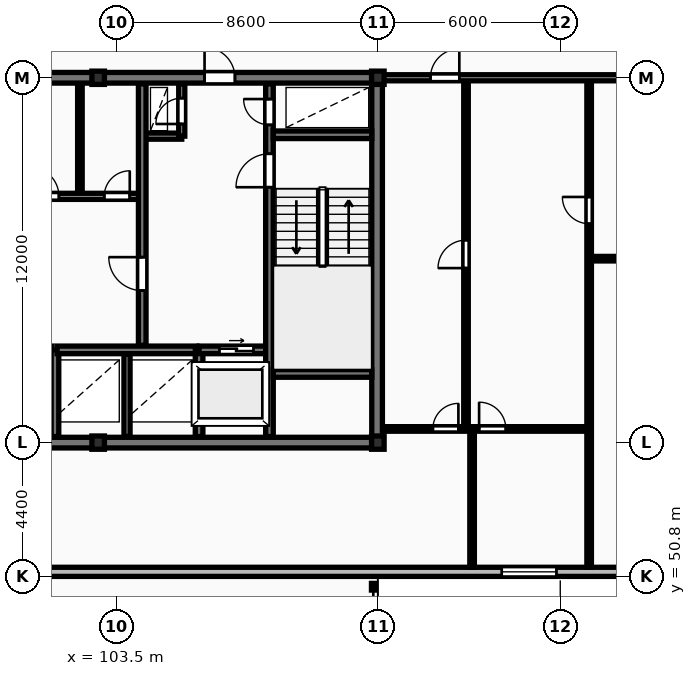
"""IFC4 building model, lengths in metres.
Left out: names, types, materials, properties, quantities, classifications, styles, units other than length and angle.
Written with IfcOpenShell. Run it as: python <this file> out.ifc"""

import sys

from ifc_helpers import new_model, si_unit, direction, frame, frame_2d, origin, origin_2d, place, context, subcontext, project, spatial, rectangle, i_section, extrude, element, fill, save


model = new_model("IFC4")
c1 = context("Model", 3, precision=1e-05, world=origin(), true_north=direction((0.0, 1.0)))
c2 = subcontext(c1, "Body", "Model", "MODEL_VIEW")
j1 = project(units=[si_unit("LENGTHUNIT", "METRE"), si_unit("PLANEANGLEUNIT", "RADIAN")], contexts=[c1])
p1 = place(None, origin())
s1 = spatial("IfcSite", under=j1, at=p1, CompositionType="ELEMENT")
p2 = place(p1, origin())
s2 = spatial("IfcBuilding", under=s1, at=p2, CompositionType="ELEMENT")
p3 = place(p2, frame((0.0, 0.0, 139.3)))
s3 = spatial("IfcBuildingStorey", under=s2, at=p3, CompositionType="ELEMENT", Elevation=139.3)
for number, where, z_axis, x_axis in (
    (1, (102.9, 55.2, 0.0), (0.0, 0.0, 1.0), (1.0, 0.0, 0.0)),
    (2, (102.9, 67.2, 0.0), (0.0, 0.0, 1.0), (1.0, 0.0, 0.0)),
    (3, (112.1, 55.2, 0.0), (0.0, 0.0, 1.0), (1.0, 0.0, 0.0)),
    (4, (112.1, 67.2, 0.0), (0.0, 0.0, 1.0), (1.0, 0.0, 0.0)),
):
    element("IfcColumn", number, at=place(p3, frame(where, z_axis=z_axis, x_axis=x_axis)), inside=s3, PredefinedType="COLUMN", context=c2, shape_type="SweptSolid", body=[
        extrude(i_section(OverallWidth=0.412, OverallDepth=0.437, WebThickness=0.036, FlangeThickness=0.052, FilletRadius=0.015, at=origin_2d()), origin(), (0.0, 0.0, 1.0), 3.6),
    ])
p4 = place(p3, frame((57.6, 50.95, 0.0), z_axis=(0.0, 0.0, 1.0), x_axis=(1.0, 0.0, 0.0)))
e5 = element("IfcWall", 5, at=p4, inside=s3, PredefinedType="STANDARD", context=c2, shape_type="SweptSolid", body=[
    extrude(rectangle(XDim=73.0, YDim=0.3, at=frame_2d((36.5, 0.0))), origin(), (0.0, 0.0, 1.0), 3.31),
])
p5 = place(p4, frame((15.225, 0.0, 0.85)))
e6 = element("IfcOpeningElement", 6, at=p5, cuts=e5, PredefinedType="OPENING", context=c2, shape_type="SweptSolid", body=[
    extrude(rectangle(XDim=1.8, YDim=1.8, at=frame_2d((0.9, 0.9))), frame((0.0, 0.16, 0.0), z_axis=(0.0, -1.0, 0.0), x_axis=(1.0, 0.0, 0.0)), (0.0, 0.0, 1.0), 0.32),
])
p6 = place(p4, frame((58.575, 0.0, 0.85)))
e7 = element("IfcOpeningElement", 7, at=p6, cuts=e5, PredefinedType="OPENING", context=c2, shape_type="SweptSolid", body=[
    extrude(rectangle(XDim=1.8, YDim=1.8, at=frame_2d((0.9, 0.9))), frame((0.0, 0.16, 0.0), z_axis=(0.0, -1.0, 0.0), x_axis=(1.0, 0.0, 0.0)), (0.0, 0.0, 1.0), 0.32),
])
p7 = place(p4, frame((33.45, 0.0, 0.0)))
e8 = element("IfcOpeningElement", 8, at=p7, cuts=e5, PredefinedType="OPENING", context=c2, shape_type="SweptSolid", body=[
    extrude(rectangle(XDim=1.1, YDim=2.1, at=frame_2d((0.55, 1.05))), frame((0.0, 0.16, 0.0), z_axis=(0.0, -1.0, 0.0), x_axis=(1.0, 0.0, 0.0)), (0.0, 0.0, 1.0), 0.32),
])
p8 = place(p3, frame((75.95, 55.2, 0.0), z_axis=(0.0, 0.0, 1.0), x_axis=(1.0, 0.0, 0.0)))
e9 = element("IfcWall", 9, at=p8, inside=s3, PredefinedType="SHEAR", context=c2, shape_type="SweptSolid", body=[
    extrude(rectangle(XDim=36.3, YDim=0.35, at=frame_2d((18.15, 0.0))), origin(), (0.0, 0.0, 1.0), 3.6),
])
p9 = place(p8, frame((15.1, 0.0, 0.0)))
e10 = element("IfcOpeningElement", 10, at=p9, cuts=e9, PredefinedType="OPENING", context=c2, shape_type="SweptSolid", body=[
    extrude(rectangle(XDim=1.1, YDim=2.1, at=frame_2d((0.55, 1.05))), frame((0.0, 0.185, 0.0), z_axis=(0.0, -1.0, 0.0), x_axis=(1.0, 0.0, 0.0)), (0.0, 0.0, 1.0), 0.37),
])
p10 = place(p3, frame((112.075, 55.375, 0.0), z_axis=(0.0, 0.0, 1.0), x_axis=(0.0, 1.0, 0.0)))
e11 = element("IfcWall", 11, at=p10, inside=s3, PredefinedType="SHEAR", context=c2, shape_type="SweptSolid", body=[
    extrude(rectangle(XDim=11.65, YDim=0.35, at=frame_2d((5.825, 0.0))), origin(), (0.0, 0.0, 1.0), 3.6),
])
p11 = place(p3, frame((75.95, 67.2, 0.0), z_axis=(0.0, 0.0, 1.0), x_axis=(1.0, 0.0, 0.0)))
e12 = element("IfcWall", 12, at=p11, inside=s3, PredefinedType="SHEAR", context=c2, shape_type="SweptSolid", body=[
    extrude(rectangle(XDim=36.3, YDim=0.35, at=frame_2d((18.15, 0.0))), origin(), (0.0, 0.0, 1.0), 3.6),
])
p12 = place(p11, frame((5.25, 0.0, 0.0)))
e13 = element("IfcOpeningElement", 13, at=p12, cuts=e12, PredefinedType="OPENING", context=c2, shape_type="SweptSolid", body=[
    extrude(rectangle(XDim=1.0, YDim=2.15, at=frame_2d((0.5, 1.075))), frame((0.0, 0.185, 0.0), z_axis=(0.0, -1.0, 0.0), x_axis=(1.0, 0.0, 0.0)), (0.0, 0.0, 1.0), 0.37),
])
p13 = place(p11, frame((21.6, 0.0, 0.0)))
e14 = element("IfcOpeningElement", 14, at=p13, cuts=e12, PredefinedType="OPENING", context=c2, shape_type="SweptSolid", body=[
    extrude(rectangle(XDim=1.5, YDim=2.2, at=frame_2d((0.75, 1.1))), frame((0.0, 0.185, 0.0), z_axis=(0.0, -1.0, 0.0), x_axis=(1.0, 0.0, 0.0)), (0.0, 0.0, 1.0), 0.37),
])
p14 = place(p11, frame((30.45, 0.0, 0.0)))
e15 = element("IfcOpeningElement", 15, at=p14, cuts=e12, PredefinedType="OPENING", context=c2, shape_type="SweptSolid", body=[
    extrude(rectangle(XDim=1.0, YDim=2.15, at=frame_2d((0.5, 1.075))), frame((0.0, 0.185, 0.0), z_axis=(0.0, -1.0, 0.0), x_axis=(1.0, 0.0, 0.0)), (0.0, 0.0, 1.0), 0.37),
])
p15 = place(p3, frame((101.48, 55.4, 0.0), z_axis=(0.0, 0.0, 1.0), x_axis=(0.0, 1.0, 0.0)))
e16 = element("IfcWall", 16, at=p15, inside=s3, PredefinedType="SHEAR", context=c2, shape_type="SweptSolid", body=[
    extrude(rectangle(XDim=2.85, YDim=0.25, at=frame_2d((1.425, 0.0))), origin(), (0.0, 0.0, 1.0), 3.6),
])
p16 = place(p3, frame((103.85, 55.4, 0.0), z_axis=(0.0, 0.0, 1.0), x_axis=(0.0, 1.0, 0.0)))
e17 = element("IfcWall", 17, at=p16, inside=s3, PredefinedType="PARTITIONING", context=c2, shape_type="SweptSolid", body=[
    extrude(rectangle(XDim=2.72, YDim=0.2, at=frame_2d((1.36, 0.0))), origin(), (0.0, 0.0, 1.0), 3.31),
])
p17 = place(p3, frame((101.55, 58.25, 0.0), z_axis=(0.0, 0.0, 1.0), x_axis=(1.0, 0.0, 0.0)))
e18 = element("IfcWall", 18, at=p17, inside=s3, PredefinedType="SHEAR", context=c2, shape_type="SweptSolid", body=[
    extrude(rectangle(XDim=4.6, YDim=0.25, at=frame_2d((2.3, 0.0))), origin(), (0.0, 0.0, 1.0), 3.6),
])
p18 = place(p3, frame((106.22, 55.4, 0.0), z_axis=(0.0, 0.0, 1.0), x_axis=(0.0, 1.0, 0.0)))
e19 = element("IfcWall", 19, at=p18, inside=s3, PredefinedType="SHEAR", context=c2, shape_type="SweptSolid", body=[
    extrude(rectangle(XDim=2.85, YDim=0.25, at=frame_2d((1.425, 0.0))), origin(), (0.0, 0.0, 1.0), 3.6),
])
p19 = place(p3, frame((106.22, 58.25, 0.0), z_axis=(0.0, 0.0, 1.0), x_axis=(1.0, 0.0, 0.0)))
e20 = element("IfcWall", 20, at=p19, inside=s3, PredefinedType="SHEAR", context=c2, shape_type="SweptSolid", body=[
    extrude(rectangle(XDim=2.46, YDim=0.25, at=frame_2d((1.23, 0.0))), origin(), (0.0, 0.0, 1.0), 3.6),
])
p20 = place(p19, frame((0.67, 0.0, 0.0)))
e21 = element("IfcOpeningElement", 21, at=p20, cuts=e20, PredefinedType="OPENING", context=c2, shape_type="SweptSolid", body=[
    extrude(rectangle(XDim=1.12, YDim=2.12, at=frame_2d((0.56, 1.06))), frame((0.0, 0.135, 0.0), z_axis=(0.0, -1.0, 0.0), x_axis=(1.0, 0.0, 0.0)), (0.0, 0.0, 1.0), 0.27),
])
p21 = place(p3, frame((102.3, 63.4, 0.0), z_axis=(0.0, 0.0, 1.0), x_axis=(0.0, 1.0, 0.0)))
e22 = element("IfcWall", 22, at=p21, inside=s3, PredefinedType="PARTITIONING", context=c2, shape_type="SweptSolid", body=[
    extrude(rectangle(XDim=3.6, YDim=0.15, at=frame_2d((1.8, 0.0))), origin(), (0.0, 0.0, 1.0), 3.31),
])
p22 = place(p3, frame((84.42, 63.3, 0.0), z_axis=(0.0, 0.0, 1.0), x_axis=(1.0, 0.0, 0.0)))
e23 = element("IfcWall", 23, at=p22, inside=s3, PredefinedType="PARTITIONING", context=c2, shape_type="SweptSolid", body=[
    extrude(rectangle(XDim=19.83, YDim=0.2, at=frame_2d((9.915, 0.0))), origin(), (0.0, 0.0, 1.0), 3.31),
])
p23 = place(p22, frame((1.15, 0.0, 0.0)))
e24 = element("IfcOpeningElement", 24, at=p23, cuts=e23, PredefinedType="OPENING", context=c2, shape_type="SweptSolid", body=[
    extrude(rectangle(XDim=0.85, YDim=2.05, at=frame_2d((0.425, 1.025))), frame((0.0, 0.11, 0.0), z_axis=(0.0, -1.0, 0.0), x_axis=(1.0, 0.0, 0.0)), (0.0, 0.0, 1.0), 0.22),
])
p24 = place(p22, frame((3.25, 0.0, 0.0)))
e25 = element("IfcOpeningElement", 25, at=p24, cuts=e23, PredefinedType="OPENING", context=c2, shape_type="SweptSolid", body=[
    extrude(rectangle(XDim=0.85, YDim=2.05, at=frame_2d((0.425, 1.025))), frame((0.0, 0.11, 0.0), z_axis=(0.0, -1.0, 0.0), x_axis=(1.0, 0.0, 0.0)), (0.0, 0.0, 1.0), 0.22),
])
p25 = place(p22, frame((13.08, 0.0, 0.0)))
e26 = element("IfcOpeningElement", 26, at=p25, cuts=e23, PredefinedType="OPENING", context=c2, shape_type="SweptSolid", body=[
    extrude(rectangle(XDim=1.5, YDim=2.2, at=frame_2d((0.75, 1.1))), frame((0.0, 0.11, 0.0), z_axis=(0.0, -1.0, 0.0), x_axis=(1.0, 0.0, 0.0)), (0.0, 0.0, 1.0), 0.22),
])
p26 = place(p22, frame((5.53, 0.0, 0.0)))
e27 = element("IfcOpeningElement", 27, at=p26, cuts=e23, PredefinedType="OPENING", context=c2, shape_type="SweptSolid", body=[
    extrude(rectangle(XDim=0.88, YDim=2.06, at=frame_2d((0.44, 1.03))), frame((0.0, 0.11, 0.0), z_axis=(0.0, -1.0, 0.0), x_axis=(1.0, 0.0, 0.0)), (0.0, 0.0, 1.0), 0.22),
])
p27 = place(p22, frame((7.68, 0.0, 0.0)))
e28 = element("IfcOpeningElement", 28, at=p27, cuts=e23, PredefinedType="OPENING", context=c2, shape_type="SweptSolid", body=[
    extrude(rectangle(XDim=0.88, YDim=2.06, at=frame_2d((0.44, 1.03))), frame((0.0, 0.11, 0.0), z_axis=(0.0, -1.0, 0.0), x_axis=(1.0, 0.0, 0.0)), (0.0, 0.0, 1.0), 0.22),
])
p28 = place(p22, frame((10.43, 0.0, 0.0)))
e29 = element("IfcOpeningElement", 29, at=p28, cuts=e23, PredefinedType="OPENING", context=c2, shape_type="SweptSolid", body=[
    extrude(rectangle(XDim=0.85, YDim=2.05, at=frame_2d((0.425, 1.025))), frame((0.0, 0.11, 0.0), z_axis=(0.0, -1.0, 0.0), x_axis=(1.0, 0.0, 0.0)), (0.0, 0.0, 1.0), 0.22),
])
p29 = place(p22, frame((16.23, 0.0, 0.0)))
e30 = element("IfcOpeningElement", 30, at=p29, cuts=e23, PredefinedType="OPENING", context=c2, shape_type="SweptSolid", body=[
    extrude(rectangle(XDim=0.96, YDim=2.1, at=frame_2d((0.48, 1.05))), frame((0.0, 0.11, 0.0), z_axis=(0.0, -1.0, 0.0), x_axis=(1.0, 0.0, 0.0)), (0.0, 0.0, 1.0), 0.22),
])
p30 = place(p22, frame((18.68, 0.0, 0.0)))
e31 = element("IfcOpeningElement", 31, at=p30, cuts=e23, PredefinedType="OPENING", context=c2, shape_type="SweptSolid", body=[
    extrude(rectangle(XDim=0.84, YDim=2.04, at=frame_2d((0.42, 1.02))), frame((0.0, 0.11, 0.0), z_axis=(0.0, -1.0, 0.0), x_axis=(1.0, 0.0, 0.0)), (0.0, 0.0, 1.0), 0.22),
])
p31 = place(p3, frame((104.45, 65.28, 0.0), z_axis=(0.0, 0.0, 1.0), x_axis=(1.0, 0.0, 0.0)))
e32 = element("IfcWall", 32, at=p31, inside=s3, PredefinedType="PARTITIONING", context=c2, shape_type="SweptSolid", body=[
    extrude(rectangle(XDim=1.2, YDim=0.2, at=frame_2d((0.6, 0.0))), origin(), (0.0, 0.0, 1.0), 3.31),
])
p32 = place(p3, frame((105.65, 65.28, 0.0), z_axis=(0.0, 0.0, 1.0), x_axis=(0.0, 1.0, 0.0)))
e33 = element("IfcWall", 33, at=p32, inside=s3, PredefinedType="PARTITIONING", context=c2, shape_type="SweptSolid", body=[
    extrude(rectangle(XDim=1.72, YDim=0.2, at=frame_2d((0.86, 0.0))), origin(), (0.0, 0.0, 1.0), 3.31),
])
p33 = place(p32, frame((0.4, 0.0, 0.0)))
e34 = element("IfcOpeningElement", 34, at=p33, cuts=e33, PredefinedType="OPENING", context=c2, shape_type="SweptSolid", body=[
    extrude(rectangle(XDim=0.85, YDim=2.05, at=frame_2d((0.425, 1.025))), frame((0.0, 0.11, 0.0), z_axis=(0.0, -1.0, 0.0), x_axis=(1.0, 0.0, 0.0)), (0.0, 0.0, 1.0), 0.22),
])
p34 = place(p3, frame((104.35, 58.4, 0.0), z_axis=(0.0, 0.0, 1.0), x_axis=(0.0, 1.0, 0.0)))
e35 = element("IfcWall", 35, at=p34, inside=s3, PredefinedType="SHEAR", context=c2, shape_type="SweptSolid", body=[
    extrude(rectangle(XDim=8.6, YDim=0.25, at=frame_2d((4.3, 0.0))), origin(), (0.0, 0.0, 1.0), 3.6),
])
p35 = place(p34, frame((1.8, 0.0, 0.0)))
e36 = element("IfcOpeningElement", 36, at=p35, cuts=e35, PredefinedType="OPENING", context=c2, shape_type="SweptSolid", body=[
    extrude(rectangle(XDim=1.1, YDim=2.1, at=frame_2d((0.55, 1.05))), frame((0.0, 0.135, 0.0), z_axis=(0.0, -1.0, 0.0), x_axis=(1.0, 0.0, 0.0)), (0.0, 0.0, 1.0), 0.27),
])
p36 = place(p3, frame((108.535, 55.4, 0.0), z_axis=(0.0, 0.0, 1.0), x_axis=(0.0, 1.0, 0.0)))
e37 = element("IfcWall", 37, at=p36, inside=s3, PredefinedType="SHEAR", context=c2, shape_type="SweptSolid", body=[
    extrude(rectangle(XDim=11.6, YDim=0.25, at=frame_2d((5.8, 0.0))), origin(), (0.0, 0.0, 1.0), 3.6),
])
p37 = place(p36, frame((8.2, 0.0, 0.0)))
e38 = element("IfcOpeningElement", 38, at=p37, cuts=e37, PredefinedType="OPENING", context=c2, shape_type="SweptSolid", body=[
    extrude(rectangle(XDim=1.1, YDim=2.1, at=frame_2d((0.55, 1.05))), frame((0.0, 0.135, 0.0), z_axis=(0.0, -1.0, 0.0), x_axis=(1.0, 0.0, 0.0)), (0.0, 0.0, 1.0), 0.27),
])
p38 = place(p36, frame((10.25, 0.0, 0.0)))
e39 = element("IfcOpeningElement", 39, at=p38, cuts=e37, PredefinedType="OPENING", context=c2, shape_type="SweptSolid", body=[
    extrude(rectangle(XDim=0.85, YDim=2.05, at=frame_2d((0.425, 1.025))), frame((0.0, 0.135, 0.0), z_axis=(0.0, -1.0, 0.0), x_axis=(1.0, 0.0, 0.0)), (0.0, 0.0, 1.0), 0.27),
])
for number, where, z_axis, x_axis in (
    (40, (108.66, 57.475, 0.0), (0.0, 0.0, 1.0), (1.0, 0.0, 0.0)),
    (41, (108.66, 65.325, 0.0), (0.0, 0.0, 1.0), (1.0, 0.0, 0.0)),
):
    element("IfcWall", number, at=place(p3, frame(where, z_axis=z_axis, x_axis=x_axis)), inside=s3, PredefinedType="SHEAR", context=c2, shape_type="SweptSolid", body=[
        extrude(rectangle(XDim=3.24, YDim=0.25, at=frame_2d((1.62, 0.0))), origin(), (0.0, 0.0, 1.0), 3.6),
    ])
p39 = place(p3, frame((119.05, 61.25, 0.0), z_axis=(0.0, 0.0, 1.0), x_axis=(1.0, 0.0, 0.0)))
e42 = element("IfcWall", 42, at=p39, inside=s3, PredefinedType="PARTITIONING", context=c2, shape_type="SweptSolid", body=[
    extrude(rectangle(XDim=11.55, YDim=0.15, at=frame_2d((5.775, 0.0))), origin(), (0.0, 0.0, 1.0), 3.31),
])
p40 = place(p39, frame((5.355, 0.0, 0.0)))
e43 = element("IfcOpeningElement", 43, at=p40, cuts=e42, PredefinedType="OPENING", context=c2, shape_type="SweptSolid", body=[
    extrude(rectangle(XDim=0.84, YDim=2.04, at=frame_2d((0.42, 1.02))), frame((0.0, 0.085, 0.0), z_axis=(0.0, -1.0, 0.0), x_axis=(1.0, 0.0, 0.0)), (0.0, 0.0, 1.0), 0.17),
])
p41 = place(p3, frame((119.05, 51.1, 0.0), z_axis=(0.0, 0.0, 1.0), x_axis=(0.0, 1.0, 0.0)))
e44 = element("IfcWall", 44, at=p41, inside=s3, PredefinedType="PARTITIONING", context=c2, shape_type="SweptSolid", body=[
    extrude(rectangle(XDim=16.05, YDim=0.15, at=frame_2d((8.025, 0.0))), origin(), (0.0, 0.0, 1.0), 3.31),
])
p42 = place(p41, frame((11.3, 0.0, 0.0)))
e45 = element("IfcOpeningElement", 45, at=p42, cuts=e44, PredefinedType="OPENING", context=c2, shape_type="SweptSolid", body=[
    extrude(rectangle(XDim=0.88, YDim=2.06, at=frame_2d((0.44, 1.03))), frame((0.0, 0.085, 0.0), z_axis=(0.0, -1.0, 0.0), x_axis=(1.0, 0.0, 0.0)), (0.0, 0.0, 1.0), 0.17),
])
p43 = place(p3, frame((115.0, 55.65, 0.0), z_axis=(0.0, 0.0, 1.0), x_axis=(0.0, 1.0, 0.0)))
e46 = element("IfcWall", 46, at=p43, inside=s3, PredefinedType="PARTITIONING", context=c2, shape_type="SweptSolid", body=[
    extrude(rectangle(XDim=11.5, YDim=0.15, at=frame_2d((5.75, 0.0))), origin(), (0.0, 0.0, 1.0), 3.31),
])
p44 = place(p43, frame((5.29, 0.0, 0.0)))
e47 = element("IfcOpeningElement", 47, at=p44, cuts=e46, PredefinedType="OPENING", context=c2, shape_type="SweptSolid", body=[
    extrude(rectangle(XDim=0.92, YDim=2.08, at=frame_2d((0.46, 1.04))), frame((0.0, 0.085, 0.0), z_axis=(0.0, -1.0, 0.0), x_axis=(1.0, 0.0, 0.0)), (0.0, 0.0, 1.0), 0.17),
])
p45 = place(p3, frame((115.2, 51.1, 0.0), z_axis=(0.0, 0.0, 1.0), x_axis=(0.0, 1.0, 0.0)))
e48 = element("IfcWall", 48, at=p45, inside=s3, PredefinedType="PARTITIONING", context=c2, shape_type="SweptSolid", body=[
    extrude(rectangle(XDim=4.55, YDim=0.15, at=frame_2d((2.275, 0.0))), origin(), (0.0, 0.0, 1.0), 3.31),
])
p46 = place(p3, frame((112.27, 55.65, 0.0), z_axis=(0.0, 0.0, 1.0), x_axis=(1.0, 0.0, 0.0)))
e49 = element("IfcWall", 49, at=p46, inside=s3, PredefinedType="PARTITIONING", context=c2, shape_type="SweptSolid", body=[
    extrude(rectangle(XDim=6.76, YDim=0.15, at=frame_2d((3.38, 0.0))), origin(), (0.0, 0.0, 1.0), 3.31),
])
p47 = place(p46, frame((1.64, 0.0, 0.0)))
e50 = element("IfcOpeningElement", 50, at=p47, cuts=e49, PredefinedType="OPENING", context=c2, shape_type="SweptSolid", body=[
    extrude(rectangle(XDim=0.84, YDim=2.04, at=frame_2d((0.42, 1.02))), frame((0.0, 0.085, 0.0), z_axis=(0.0, -1.0, 0.0), x_axis=(1.0, 0.0, 0.0)), (0.0, 0.0, 1.0), 0.17),
])
p48 = place(p46, frame((3.16, 0.0, 0.0)))
e51 = element("IfcOpeningElement", 51, at=p48, cuts=e49, PredefinedType="OPENING", context=c2, shape_type="SweptSolid", body=[
    extrude(rectangle(XDim=0.88, YDim=2.06, at=frame_2d((0.44, 1.03))), frame((0.0, 0.085, 0.0), z_axis=(0.0, -1.0, 0.0), x_axis=(1.0, 0.0, 0.0)), (0.0, 0.0, 1.0), 0.17),
])
p49 = place(p3, frame((112.25, 67.2, 0.0), z_axis=(0.0, 0.0, 1.0), x_axis=(1.0, 0.0, 0.0)))
e52 = element("IfcWall", 52, at=p49, inside=s3, PredefinedType="PARTITIONING", context=c2, shape_type="SweptSolid", body=[
    extrude(rectangle(XDim=18.35, YDim=0.2, at=frame_2d((9.175, 0.0))), origin(), (0.0, 0.0, 1.0), 2.773),
])
p50 = place(p49, frame((1.58, 0.0, 0.0)))
e53 = element("IfcOpeningElement", 53, at=p50, cuts=e52, PredefinedType="OPENING", context=c2, shape_type="SweptSolid", body=[
    extrude(rectangle(XDim=0.95, YDim=2.15, at=frame_2d((0.475, 1.075))), frame((0.0, 0.11, 0.0), z_axis=(0.0, -1.0, 0.0), x_axis=(1.0, 0.0, 0.0)), (0.0, 0.0, 1.0), 0.22),
])
p51 = place(p6, origin())
e54 = element("IfcWindow", 54, at=p51, inside=s3, PartitioningType="SINGLE_PANEL", PredefinedType="WINDOW", context=c2, shape_type="SweptSolid", body=[
    extrude(rectangle(XDim=1.8, YDim=1.8, at=frame_2d((0.9, 0.9))), frame((0.0, 0.03, 0.0), z_axis=(0.0, -1.0, 0.0), x_axis=(1.0, 0.0, 0.0)), (0.0, 0.0, 1.0), 0.06),
])
fill(e7, e54)
p52 = place(p14, origin())
e55 = element("IfcDoor", 55, at=p52, inside=s3, OperationType="SINGLE_SWING_LEFT", PredefinedType="DOOR", context=c2, shape_type="SweptSolid", body=[
    extrude(rectangle(XDim=1.0, YDim=2.15, at=frame_2d((0.5, 1.075))), frame((0.0, 0.025, 0.0), z_axis=(0.0, -1.0, 0.0), x_axis=(1.0, 0.0, 0.0)), (0.0, 0.0, 1.0), 0.05),
])
fill(e15, e55)
p53 = place(p20, origin())
e56 = element("IfcDoor", 56, at=p53, inside=s3, OperationType="SLIDING_TO_RIGHT", PredefinedType="DOOR", context=c2, shape_type="SweptSolid", body=[
    extrude(rectangle(XDim=1.12, YDim=2.12, at=frame_2d((0.56, 1.06))), frame((0.0, 0.025, 0.0), z_axis=(0.0, -1.0, 0.0), x_axis=(1.0, 0.0, 0.0)), (0.0, 0.0, 1.0), 0.05),
])
fill(e21, e56)
p54 = place(p29, origin())
e57 = element("IfcDoor", 57, at=p54, inside=s3, OperationType="SINGLE_SWING_LEFT", PredefinedType="DOOR", context=c2, shape_type="SweptSolid", body=[
    extrude(rectangle(XDim=0.96, YDim=2.1, at=frame_2d((0.48, 1.05))), frame((0.0, 0.025, 0.0), z_axis=(0.0, -1.0, 0.0), x_axis=(1.0, 0.0, 0.0)), (0.0, 0.0, 1.0), 0.05),
])
fill(e30, e57)
p55 = place(p30, origin())
e58 = element("IfcDoor", 58, at=p55, inside=s3, OperationType="SINGLE_SWING_RIGHT", PredefinedType="DOOR", context=c2, shape_type="SweptSolid", body=[
    extrude(rectangle(XDim=0.84, YDim=2.04, at=frame_2d((0.42, 1.02))), frame((0.0, 0.025, 0.0), z_axis=(0.0, -1.0, 0.0), x_axis=(1.0, 0.0, 0.0)), (0.0, 0.0, 1.0), 0.05),
])
fill(e31, e58)
p56 = place(p33, origin())
e59 = element("IfcDoor", 59, at=p56, inside=s3, OperationType="SINGLE_SWING_LEFT", PredefinedType="DOOR", context=c2, shape_type="SweptSolid", body=[
    extrude(rectangle(XDim=0.85, YDim=2.05, at=frame_2d((0.425, 1.025))), frame((0.0, 0.025, 0.0), z_axis=(0.0, -1.0, 0.0), x_axis=(1.0, 0.0, 0.0)), (0.0, 0.0, 1.0), 0.05),
])
fill(e34, e59)
p57 = place(p35, origin())
e60 = element("IfcDoor", 60, at=p57, inside=s3, OperationType="SINGLE_SWING_RIGHT", PredefinedType="DOOR", context=c2, shape_type="SweptSolid", body=[
    extrude(rectangle(XDim=1.1, YDim=2.1, at=frame_2d((0.55, 1.05))), frame((0.0, 0.025, 0.0), z_axis=(0.0, -1.0, 0.0), x_axis=(1.0, 0.0, 0.0)), (0.0, 0.0, 1.0), 0.05),
])
fill(e36, e60)
p58 = place(p37, origin())
e61 = element("IfcDoor", 61, at=p58, inside=s3, OperationType="SINGLE_SWING_LEFT", PredefinedType="DOOR", context=c2, shape_type="SweptSolid", body=[
    extrude(rectangle(XDim=1.1, YDim=2.1, at=frame_2d((0.55, 1.05))), frame((0.0, 0.025, 0.0), z_axis=(0.0, -1.0, 0.0), x_axis=(1.0, 0.0, 0.0)), (0.0, 0.0, 1.0), 0.05),
])
fill(e38, e61)
p59 = place(p38, origin())
e62 = element("IfcDoor", 62, at=p59, inside=s3, OperationType="SINGLE_SWING_RIGHT", PredefinedType="DOOR", context=c2, shape_type="SweptSolid", body=[
    extrude(rectangle(XDim=0.85, YDim=2.05, at=frame_2d((0.425, 1.025))), frame((0.0, 0.025, 0.0), z_axis=(0.0, -1.0, 0.0), x_axis=(1.0, 0.0, 0.0)), (0.0, 0.0, 1.0), 0.05),
])
fill(e39, e62)
p60 = place(p42, origin())
e63 = element("IfcDoor", 63, at=p60, inside=s3, OperationType="SINGLE_SWING_RIGHT", PredefinedType="DOOR", context=c2, shape_type="SweptSolid", body=[
    extrude(rectangle(XDim=0.88, YDim=2.06, at=frame_2d((0.44, 1.03))), frame((0.0, 0.025, 0.0), z_axis=(0.0, -1.0, 0.0), x_axis=(1.0, 0.0, 0.0)), (0.0, 0.0, 1.0), 0.05),
])
fill(e45, e63)
p61 = place(p44, origin())
e64 = element("IfcDoor", 64, at=p61, inside=s3, OperationType="SINGLE_SWING_LEFT", PredefinedType="DOOR", context=c2, shape_type="SweptSolid", body=[
    extrude(rectangle(XDim=0.92, YDim=2.08, at=frame_2d((0.46, 1.04))), frame((0.0, 0.025, 0.0), z_axis=(0.0, -1.0, 0.0), x_axis=(1.0, 0.0, 0.0)), (0.0, 0.0, 1.0), 0.05),
])
fill(e47, e64)
p62 = place(p47, origin())
e65 = element("IfcDoor", 65, at=p62, inside=s3, OperationType="SINGLE_SWING_RIGHT", PredefinedType="DOOR", context=c2, shape_type="SweptSolid", body=[
    extrude(rectangle(XDim=0.84, YDim=2.04, at=frame_2d((0.42, 1.02))), frame((0.0, 0.025, 0.0), z_axis=(0.0, -1.0, 0.0), x_axis=(1.0, 0.0, 0.0)), (0.0, 0.0, 1.0), 0.05),
])
fill(e50, e65)
p63 = place(p48, origin())
e66 = element("IfcDoor", 66, at=p63, inside=s3, OperationType="SINGLE_SWING_LEFT", PredefinedType="DOOR", context=c2, shape_type="SweptSolid", body=[
    extrude(rectangle(XDim=0.88, YDim=2.06, at=frame_2d((0.44, 1.03))), frame((0.0, 0.025, 0.0), z_axis=(0.0, -1.0, 0.0), x_axis=(1.0, 0.0, 0.0)), (0.0, 0.0, 1.0), 0.05),
])
fill(e51, e66)
p64 = place(p50, origin())
e67 = element("IfcDoor", 67, at=p64, inside=s3, OperationType="SINGLE_SWING_RIGHT", PredefinedType="DOOR", context=c2, shape_type="SweptSolid", body=[
    extrude(rectangle(XDim=0.95, YDim=2.15, at=frame_2d((0.475, 1.075))), frame((0.0, 0.025, 0.0), z_axis=(0.0, -1.0, 0.0), x_axis=(1.0, 0.0, 0.0)), (0.0, 0.0, 1.0), 0.05),
])
fill(e53, e67)
save(model, sys.argv[1])
